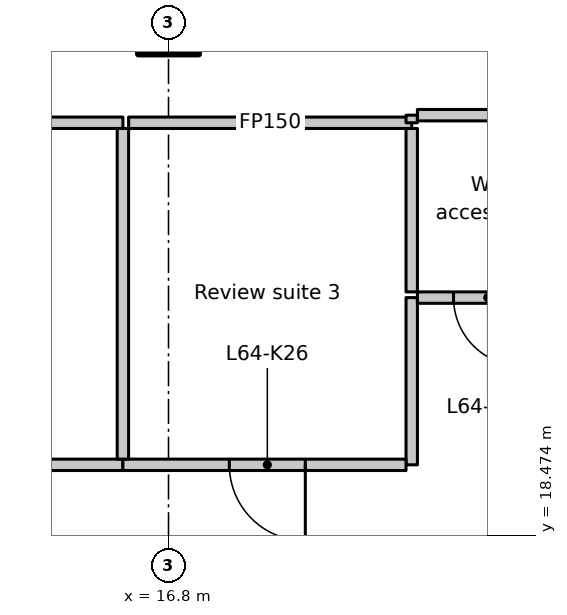
"""IFC4 building model, lengths in metres.
Left out: names, types, materials, properties, quantities, classifications, styles, units other than length and angle.
Written with IfcOpenShell. Run it as: python <this file> out.ifc"""

import sys

from ifc_helpers import new_model, si_unit, direction, frame, frame_2d, origin, origin_2d, place, context, subcontext, project, spatial, rectangle, extrude, element, fill, save


model = new_model("IFC4")
c1 = context("Model", 3, precision=1e-05, world=origin(), true_north=direction((0.0, 1.0)))
c2 = subcontext(c1, "Body", "Model", "MODEL_VIEW")
j1 = project(units=[si_unit("LENGTHUNIT", "METRE"), si_unit("PLANEANGLEUNIT", "RADIAN")], contexts=[c1])
p1 = place(None, origin())
s1 = spatial("IfcSite", under=j1, at=p1, CompositionType="ELEMENT")
p2 = place(p1, origin())
s2 = spatial("IfcBuilding", under=s1, at=p2, CompositionType="ELEMENT")
p3 = place(p2, frame((0.0, 0.0, 251.7)))
s3 = spatial("IfcBuildingStorey", under=s2, at=p3, CompositionType="ELEMENT", Elevation=251.7)
p4 = place(p3, frame((16.8, 25.2, 0.0), z_axis=(0.0, 0.0, 1.0), x_axis=(1.0, 0.0, 0.0)))
e1 = element("IfcColumn", 1, at=p4, inside=s3, PredefinedType="COLUMN", context=c2, shape_type="SweptSolid", body=[
    extrude(rectangle(XDim=0.8, YDim=0.8, at=origin_2d()), origin(), (0.0, 0.0, 1.0), 4.05),
])
p5 = place(p3, frame((16.2, 19.4, 0.0), z_axis=(0.0, 0.0, 1.0), x_axis=(-1.0, 0.0, 0.0)))
e2 = element("IfcWall", 2, at=p5, inside=s3, PredefinedType="PARTITIONING", context=c2, shape_type="SweptSolid", body=[
    extrude(rectangle(XDim=3.9, YDim=0.15, at=frame_2d((1.95, 0.0))), origin(), (0.0, 0.0, 1.0), 4.05),
])
p6 = place(p5, frame((1.45, 0.0, 0.0)))
e3 = element("IfcOpeningElement", 3, at=p6, cuts=e2, PredefinedType="OPENING", context=c2, shape_type="SweptSolid", body=[
    extrude(rectangle(XDim=1.0, YDim=2.1, at=frame_2d((0.5, 1.05))), frame((0.0, 0.085, 0.0), z_axis=(0.0, -1.0, 0.0), x_axis=(1.0, 0.0, 0.0)), (0.0, 0.0, 1.0), 0.17),
])
p7 = place(p3, frame((12.375, 23.9, 0.0), z_axis=(0.0, 0.0, 1.0), x_axis=(1.0, 0.0, 0.0)))
e4 = element("IfcWall", 4, at=p7, inside=s3, PredefinedType="PARTITIONING", context=c2, shape_type="SweptSolid", body=[
    extrude(rectangle(XDim=3.825, YDim=0.15, at=frame_2d((1.913, 0.0))), origin(), (0.0, 0.0, 1.0), 4.05),
])
p8 = place(p3, frame((20.0, 21.6, 0.0), z_axis=(0.0, 0.0, 1.0), x_axis=(0.0, -1.0, 0.0)))
e5 = element("IfcWall", 5, at=p8, inside=s3, PredefinedType="PARTITIONING", context=c2, shape_type="SweptSolid", body=[
    extrude(rectangle(XDim=2.2, YDim=0.15, at=frame_2d((1.1, 0.0))), origin(), (0.0, 0.0, 1.0), 4.05),
])
p9 = place(p3, frame((19.925, 19.4, 0.0), z_axis=(0.0, 0.0, 1.0), x_axis=(-1.0, 0.0, 0.0)))
e6 = element("IfcWall", 6, at=p9, inside=s3, PredefinedType="PARTITIONING", context=c2, shape_type="SweptSolid", body=[
    extrude(rectangle(XDim=3.725, YDim=0.15, at=frame_2d((1.863, 0.0))), origin(), (0.0, 0.0, 1.0), 4.05),
])
p10 = place(p9, frame((1.325, 0.0, 0.0)))
e7 = element("IfcOpeningElement", 7, at=p10, cuts=e6, PredefinedType="OPENING", context=c2, shape_type="SweptSolid", body=[
    extrude(rectangle(XDim=1.0, YDim=2.1, at=frame_2d((0.5, 1.05))), frame((0.0, 0.085, 0.0), z_axis=(0.0, -1.0, 0.0), x_axis=(1.0, 0.0, 0.0)), (0.0, 0.0, 1.0), 0.17),
])
p11 = place(p3, frame((16.2, 23.825, 0.0), z_axis=(0.0, 0.0, 1.0), x_axis=(0.0, -1.0, 0.0)))
e8 = element("IfcWall", 8, at=p11, inside=s3, PredefinedType="PARTITIONING", context=c2, shape_type="SweptSolid", body=[
    extrude(rectangle(XDim=4.35, YDim=0.15, at=frame_2d((2.175, 0.0))), origin(), (0.0, 0.0, 1.0), 4.05),
])
p12 = place(p3, frame((16.275, 23.9, 0.0), z_axis=(0.0, 0.0, 1.0), x_axis=(1.0, 0.0, 0.0)))
e9 = element("IfcWall", 9, at=p12, inside=s3, PredefinedType="PARTITIONING", context=c2, shape_type="SweptSolid", body=[
    extrude(rectangle(XDim=3.725, YDim=0.15, at=frame_2d((1.863, 0.0))), origin(), (0.0, 0.0, 1.0), 4.05),
])
p13 = place(p3, frame((20.0, 23.9, 0.0), z_axis=(0.0, 0.0, 1.0), x_axis=(0.0, 1.0, 0.0)))
e10 = element("IfcWall", 10, at=p13, inside=s3, PredefinedType="PARTITIONING", context=c2, shape_type="SweptSolid", body=[
    extrude(rectangle(XDim=0.1, YDim=0.15, at=frame_2d((0.05, 0.0))), origin(), (0.0, 0.0, 1.0), 4.05),
])
p14 = place(p3, frame((20.075, 24.0, 0.0), z_axis=(0.0, 0.0, 1.0), x_axis=(1.0, 0.0, 0.0)))
e11 = element("IfcWall", 11, at=p14, inside=s3, PredefinedType="PARTITIONING", context=c2, shape_type="SweptSolid", body=[
    extrude(rectangle(XDim=1.925, YDim=0.15, at=frame_2d((0.962, 0.0))), origin(), (0.0, 0.0, 1.0), 4.05),
])
p15 = place(p3, frame((21.925, 21.6, 0.0), z_axis=(0.0, 0.0, 1.0), x_axis=(-1.0, 0.0, 0.0)))
e12 = element("IfcWall", 12, at=p15, inside=s3, PredefinedType="PARTITIONING", context=c2, shape_type="SweptSolid", body=[
    extrude(rectangle(XDim=1.85, YDim=0.15, at=frame_2d((0.925, 0.0))), origin(), (0.0, 0.0, 1.0), 4.05),
])
p16 = place(p15, frame((0.475, 0.0, 0.0)))
e13 = element("IfcOpeningElement", 13, at=p16, cuts=e12, PredefinedType="OPENING", context=c2, shape_type="SweptSolid", body=[
    extrude(rectangle(XDim=0.9, YDim=2.1, at=frame_2d((0.45, 1.05))), frame((0.0, 0.085, 0.0), z_axis=(0.0, -1.0, 0.0), x_axis=(1.0, 0.0, 0.0)), (0.0, 0.0, 1.0), 0.17),
])
p17 = place(p3, frame((20.0, 21.675, 0.0), z_axis=(0.0, 0.0, 1.0), x_axis=(0.0, 1.0, 0.0)))
e14 = element("IfcWall", 14, at=p17, inside=s3, PredefinedType="PARTITIONING", context=c2, shape_type="SweptSolid", body=[
    extrude(rectangle(XDim=2.15, YDim=0.15, at=frame_2d((1.075, 0.0))), origin(), (0.0, 0.0, 1.0), 4.05),
])
p18 = place(p16, origin())
e15 = element("IfcDoor", 15, at=p18, inside=s3, OperationType="SINGLE_SWING_LEFT", PredefinedType="DOOR", context=c2, shape_type="SweptSolid", body=[
    extrude(rectangle(XDim=0.9, YDim=2.1, at=frame_2d((0.45, 1.05))), frame((0.0, 0.025, 0.0), z_axis=(0.0, -1.0, 0.0), x_axis=(1.0, 0.0, 0.0)), (0.0, 0.0, 1.0), 0.05),
])
fill(e13, e15)
p19 = place(p10, origin())
e16 = element("IfcDoor", 16, at=p19, inside=s3, OperationType="SINGLE_SWING_RIGHT", PredefinedType="DOOR", context=c2, shape_type="SweptSolid", body=[
    extrude(rectangle(XDim=1.0, YDim=2.1, at=frame_2d((0.5, 1.05))), frame((0.0, 0.025, 0.0), z_axis=(0.0, -1.0, 0.0), x_axis=(1.0, 0.0, 0.0)), (0.0, 0.0, 1.0), 0.05),
])
fill(e7, e16)
save(model, sys.argv[1])
